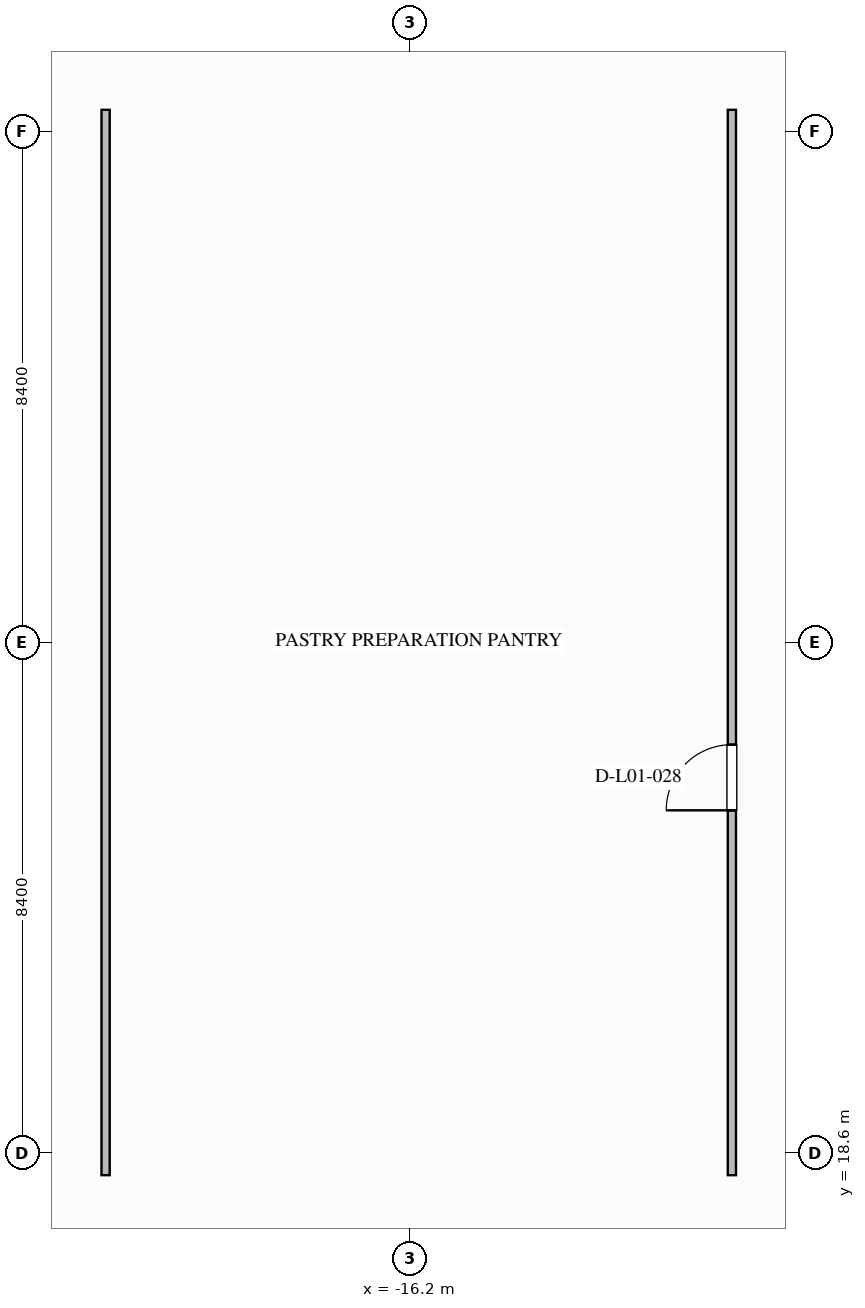
"""IFC4 building model, lengths in metres.
Left out: names, types, materials, properties, quantities, classifications, styles, units other than length and angle.
Written with IfcOpenShell. Run it as: python <this file> out.ifc"""

import sys

from ifc_helpers import new_model, si_unit, direction, frame, frame_2d, origin, place, context, subcontext, project, spatial, rectangle, extrude, element, fill, save


model = new_model("IFC4")
c1 = context("Model", 3, precision=1e-05, world=origin(), true_north=direction((0.0, 1.0)))
c2 = subcontext(c1, "Body", "Model", "MODEL_VIEW")
j1 = project(units=[si_unit("LENGTHUNIT", "METRE"), si_unit("PLANEANGLEUNIT", "RADIAN")], contexts=[c1])
p1 = place(None, origin())
s1 = spatial("IfcSite", under=j1, at=p1, CompositionType="ELEMENT")
p2 = place(p1, origin())
s2 = spatial("IfcBuilding", under=s1, at=p2, CompositionType="ELEMENT")
p3 = place(p2, frame((0.0, 0.0, 5.6)))
s3 = spatial("IfcBuildingStorey", under=s2, at=p3, CompositionType="ELEMENT", Elevation=5.6)
p4 = place(p3, frame((-10.9, 18.24, 0.0), z_axis=(0.0, 0.0, 1.0), x_axis=(0.0, 1.0, 0.0)))
e1 = element("IfcWall", 1, at=p4, inside=s3, PredefinedType="PARTITIONING", context=c2, shape_type="SweptSolid", body=[
    extrude(rectangle(XDim=17.52, YDim=0.135, at=frame_2d((8.76, 0.0))), origin(), (0.0, 0.0, 1.0), 4.85),
])
p5 = place(p4, frame((6.0, 0.0, 0.0)))
e2 = element("IfcOpeningElement", 2, at=p5, cuts=e1, PredefinedType="OPENING", context=c2, shape_type="SweptSolid", body=[
    extrude(rectangle(XDim=1.08, YDim=2.04, at=frame_2d((0.54, 1.02))), frame((0.0, 0.077, 0.0), z_axis=(0.0, -1.0, 0.0), x_axis=(1.0, 0.0, 0.0)), (0.0, 0.0, 1.0), 0.155),
])
p6 = place(p3, frame((-21.2, 18.24, 0.0), z_axis=(0.0, 0.0, 1.0), x_axis=(0.0, 1.0, 0.0)))
e3 = element("IfcWall", 3, at=p6, inside=s3, PredefinedType="PARTITIONING", context=c2, shape_type="SweptSolid", body=[
    extrude(rectangle(XDim=17.52, YDim=0.135, at=frame_2d((8.76, 0.0))), origin(), (0.0, 0.0, 1.0), 4.85),
])
p7 = place(p5, origin())
e4 = element("IfcDoor", 4, at=p7, inside=s3, OperationType="SINGLE_SWING_LEFT", PredefinedType="DOOR", context=c2, shape_type="SweptSolid", body=[
    extrude(rectangle(XDim=1.08, YDim=2.04, at=frame_2d((0.54, 1.02))), frame((0.0, 0.025, 0.0), z_axis=(0.0, -1.0, 0.0), x_axis=(1.0, 0.0, 0.0)), (0.0, 0.0, 1.0), 0.05),
])
fill(e2, e4)
save(model, sys.argv[1])
